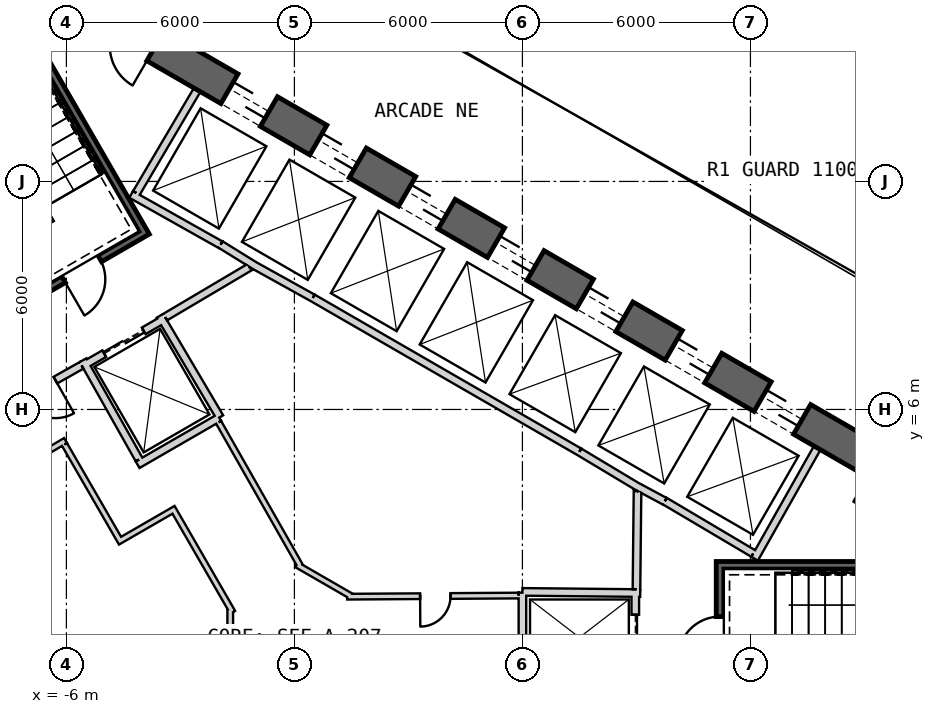
"""IFC4 building model, lengths in metres.
Left out: names, types, materials, properties, quantities, classifications, styles, units other than length and angle.
Written with IfcOpenShell. Run it as: python <this file> out.ifc"""

import sys

from ifc_helpers import new_model, si_unit, direction, frame, frame_2d, origin, place, context, subcontext, project, spatial, rectangle, extrude, element, fill, save


model = new_model("IFC4")
c1 = context("Model", 3, precision=1e-05, world=origin(), true_north=direction((0.0, 1.0)))
c2 = subcontext(c1, "Body", "Model", "MODEL_VIEW")
j1 = project(units=[si_unit("LENGTHUNIT", "METRE"), si_unit("PLANEANGLEUNIT", "RADIAN")], contexts=[c1])
p1 = place(None, origin())
s1 = spatial("IfcSite", under=j1, at=p1, CompositionType="ELEMENT")
p2 = place(p1, origin())
s2 = spatial("IfcBuilding", under=s1, at=p2, CompositionType="ELEMENT")
p3 = place(p2, frame((0.0, 0.0, 27.5)))
s3 = spatial("IfcBuildingStorey", under=s2, at=p3, CompositionType="ELEMENT", Elevation=27.5)
p4 = place(p3, frame((19.475, 2.208, 0.0), z_axis=(0.0, 0.0, 1.0), x_axis=(-0.866028369851, 0.499994862586, 0.0)))
e1 = element("IfcWall", 1, at=p4, inside=s3, PredefinedType="SHEAR", context=c2, shape_type="SweptSolid", body=[
    extrude(rectangle(XDim=31.523, YDim=0.9, at=frame_2d((15.762, 0.0))), origin(), (0.0, 0.0, 1.0), 6.0),
])
p5 = place(p4, frame((7.062, 0.0, 0.0)))
e2 = element("IfcOpeningElement", 2, at=p5, cuts=e1, PredefinedType="OPENING", context=c2, shape_type="SweptSolid", body=[
    extrude(rectangle(XDim=1.2, YDim=2.4, at=frame_2d((0.6, 1.2))), frame((0.0, 0.46, 0.0), z_axis=(0.0, -1.0, 0.0), x_axis=(1.0, 0.0, 0.0)), (0.0, 0.0, 1.0), 0.92),
])
p6 = place(p4, frame((9.762, 0.0, 0.0)))
e3 = element("IfcOpeningElement", 3, at=p6, cuts=e1, PredefinedType="OPENING", context=c2, shape_type="SweptSolid", body=[
    extrude(rectangle(XDim=1.2, YDim=2.4, at=frame_2d((0.6, 1.2))), frame((0.0, 0.46, 0.0), z_axis=(0.0, -1.0, 0.0), x_axis=(1.0, 0.0, 0.0)), (0.0, 0.0, 1.0), 0.92),
])
p7 = place(p4, frame((12.462, 0.0, 0.0)))
e4 = element("IfcOpeningElement", 4, at=p7, cuts=e1, PredefinedType="OPENING", context=c2, shape_type="SweptSolid", body=[
    extrude(rectangle(XDim=1.2, YDim=2.4, at=frame_2d((0.6, 1.2))), frame((0.0, 0.46, 0.0), z_axis=(0.0, -1.0, 0.0), x_axis=(1.0, 0.0, 0.0)), (0.0, 0.0, 1.0), 0.92),
])
p8 = place(p4, frame((15.162, 0.0, 0.0)))
e5 = element("IfcOpeningElement", 5, at=p8, cuts=e1, PredefinedType="OPENING", context=c2, shape_type="SweptSolid", body=[
    extrude(rectangle(XDim=1.2, YDim=2.4, at=frame_2d((0.6, 1.2))), frame((0.0, 0.46, 0.0), z_axis=(0.0, -1.0, 0.0), x_axis=(1.0, 0.0, 0.0)), (0.0, 0.0, 1.0), 0.92),
])
p9 = place(p4, frame((17.862, 0.0, 0.0)))
e6 = element("IfcOpeningElement", 6, at=p9, cuts=e1, PredefinedType="OPENING", context=c2, shape_type="SweptSolid", body=[
    extrude(rectangle(XDim=1.2, YDim=2.4, at=frame_2d((0.6, 1.2))), frame((0.0, 0.46, 0.0), z_axis=(0.0, -1.0, 0.0), x_axis=(1.0, 0.0, 0.0)), (0.0, 0.0, 1.0), 0.92),
])
p10 = place(p4, frame((20.562, 0.0, 0.0)))
e7 = element("IfcOpeningElement", 7, at=p10, cuts=e1, PredefinedType="OPENING", context=c2, shape_type="SweptSolid", body=[
    extrude(rectangle(XDim=1.2, YDim=2.4, at=frame_2d((0.6, 1.2))), frame((0.0, 0.46, 0.0), z_axis=(0.0, -1.0, 0.0), x_axis=(1.0, 0.0, 0.0)), (0.0, 0.0, 1.0), 0.92),
])
p11 = place(p4, frame((23.262, 0.0, 0.0)))
e8 = element("IfcOpeningElement", 8, at=p11, cuts=e1, PredefinedType="OPENING", context=c2, shape_type="SweptSolid", body=[
    extrude(rectangle(XDim=1.2, YDim=2.4, at=frame_2d((0.6, 1.2))), frame((0.0, 0.46, 0.0), z_axis=(0.0, -1.0, 0.0), x_axis=(1.0, 0.0, 0.0)), (0.0, 0.0, 1.0), 0.92),
])
p12 = place(p4, frame((3.612, 0.0, 0.0)))
e9 = element("IfcOpeningElement", 9, at=p12, cuts=e1, PredefinedType="OPENING", context=c2, shape_type="SweptSolid", body=[
    extrude(rectangle(XDim=1.2, YDim=2.4, at=frame_2d((0.6, 1.2))), frame((0.0, 0.46, 0.0), z_axis=(0.0, -1.0, 0.0), x_axis=(1.0, 0.0, 0.0)), (0.0, 0.0, 1.0), 0.92),
])
p13 = place(p4, frame((26.712, 0.0, 0.0)))
e10 = element("IfcOpeningElement", 10, at=p13, cuts=e1, PredefinedType="OPENING", context=c2, shape_type="SweptSolid", body=[
    extrude(rectangle(XDim=1.2, YDim=2.4, at=frame_2d((0.6, 1.2))), frame((0.0, 0.46, 0.0), z_axis=(0.0, -1.0, 0.0), x_axis=(1.0, 0.0, 0.0)), (0.0, 0.0, 1.0), 0.92),
])
p14 = place(p3, frame((7.497, 4.886, 0.0), z_axis=(0.0, 0.0, 1.0), x_axis=(-0.866030989016, 0.499990325971, 0.0)))
e11 = element("IfcWall", 11, at=p14, inside=s3, PredefinedType="PLUMBINGWALL", context=c2, shape_type="SweptSolid", body=[
    extrude(rectangle(XDim=8.1, YDim=0.2, at=frame_2d((4.05, 0.0))), origin(), (0.0, 0.0, 1.0), 5.7),
])
p15 = place(p3, frame((12.11, 2.073, 0.0), z_axis=(0.0, 0.0, 1.0), x_axis=(0.49196600604, 0.870614408852, 0.0)))
e12 = element("IfcWall", 12, at=p15, inside=s3, PredefinedType="PLUMBINGWALL", context=c2, shape_type="SweptSolid", body=[
    extrude(rectangle(XDim=3.35, YDim=0.2, at=frame_2d((1.675, 0.0))), origin(), (0.0, 0.0, 1.0), 5.7),
])
p16 = place(p3, frame((12.073, 2.211, 0.0), z_axis=(0.0, 0.0, 1.0), x_axis=(-0.860438357912, 0.509554542943, 0.0)))
e13 = element("IfcWall", 13, at=p16, inside=s3, PredefinedType="PLUMBINGWALL", context=c2, shape_type="SweptSolid", body=[
    extrude(rectangle(XDim=2.7, YDim=0.2, at=frame_2d((1.35, 0.0))), origin(), (0.0, 0.0, 1.0), 5.7),
])
p17 = place(p3, frame((9.748, 3.583, 0.0), z_axis=(0.0, 0.0, 1.0), x_axis=(-0.880917147855, 0.473270513147, 0.0)))
e14 = element("IfcWall", 14, at=p17, inside=s3, PredefinedType="PLUMBINGWALL", context=c2, shape_type="SweptSolid", body=[
    extrude(rectangle(XDim=0.878, YDim=0.2, at=frame_2d((0.439, 0.0))), origin(), (0.0, 0.0, 1.0), 5.7),
])
p18 = place(p3, frame((9.079, 3.937, 0.0), z_axis=(0.0, 0.0, 1.0), x_axis=(-0.857516281273, 0.51445682749, 0.0)))
e15 = element("IfcWall", 15, at=p18, inside=s3, PredefinedType="PLUMBINGWALL", context=c2, shape_type="SweptSolid", body=[
    extrude(rectangle(XDim=1.845, YDim=0.2, at=frame_2d((0.922, 0.0))), origin(), (0.0, 0.0, 1.0), 5.7),
])
p19 = place(p3, frame((-1.941, 10.339, 0.0), z_axis=(0.0, 0.0, 1.0), x_axis=(0.850216889117, -0.526432561171, 0.0)))
e16 = element("IfcWall", 16, at=p19, inside=s3, PredefinedType="PLUMBINGWALL", context=c2, shape_type="SweptSolid", body=[
    extrude(rectangle(XDim=1.078, YDim=0.2, at=frame_2d((0.539, 0.0))), origin(), (0.0, 0.0, 1.0), 5.7),
])
p20 = place(p3, frame((0.483, 8.936, 0.0), z_axis=(0.0, 0.0, 1.0), x_axis=(-0.874269620932, 0.485440655401, 0.0)))
e17 = element("IfcWall", 17, at=p20, inside=s3, PredefinedType="PLUMBINGWALL", context=c2, shape_type="SweptSolid", body=[
    extrude(rectangle(XDim=1.845, YDim=0.2, at=frame_2d((0.922, 0.0))), origin(), (0.0, 0.0, 1.0), 5.7),
])
p21 = place(p3, frame((-4.296, 11.659, 0.0), z_axis=(0.0, 0.0, 1.0), x_axis=(0.871534483978, -0.490334215854, 0.0)))
e18 = element("IfcWall", 18, at=p21, inside=s3, PredefinedType="PLUMBINGWALL", context=c2, shape_type="SweptSolid", body=[
    extrude(rectangle(XDim=2.7, YDim=0.2, at=frame_2d((1.35, 0.0))), origin(), (0.0, 0.0, 1.0), 5.7),
])
p22 = place(p3, frame((-4.158, 11.696, 0.0), z_axis=(0.0, 0.0, 1.0), x_axis=(0.508018930956, 0.861345903683, 0.0)))
e19 = element("IfcWall", 19, at=p22, inside=s3, PredefinedType="PLUMBINGWALL", context=c2, shape_type="SweptSolid", body=[
    extrude(rectangle(XDim=3.15, YDim=0.2, at=frame_2d((1.575, 0.0))), origin(), (0.0, 0.0, 1.0), 5.7),
])
p23 = place(p3, frame((19.2, 1.9, -0.3), z_axis=(0.0, 0.0, 1.0), x_axis=(-1.0, 0.0, 0.0)))
e20 = element("IfcWall", 20, at=p23, inside=s3, PredefinedType="SHEAR", context=c2, shape_type="SweptSolid", body=[
    extrude(rectangle(XDim=8.1, YDim=0.2, at=frame_2d((4.05, 0.0))), origin(), (0.0, 0.0, 1.0), 6.0),
])
p24 = place(p3, frame((11.2, -1.8, -0.3), z_axis=(0.0, 0.0, 1.0), x_axis=(0.0, 1.0, 0.0)))
e21 = element("IfcWall", 21, at=p24, inside=s3, PredefinedType="SHEAR", context=c2, shape_type="SweptSolid", body=[
    extrude(rectangle(XDim=3.6, YDim=0.2, at=frame_2d((1.8, 0.0))), origin(), (0.0, 0.0, 1.0), 6.0),
])
p25 = place(p24, frame((1.25, 0.0, 0.3)))
e22 = element("IfcOpeningElement", 22, at=p25, cuts=e21, PredefinedType="OPENING", context=c2, shape_type="SweptSolid", body=[
    extrude(rectangle(XDim=1.1, YDim=2.1, at=frame_2d((0.55, 1.05))), frame((0.0, 0.11, 0.0), z_axis=(0.0, -1.0, 0.0), x_axis=(1.0, 0.0, 0.0)), (0.0, 0.0, 1.0), 0.22),
])
p26 = place(p3, frame((8.97, 1.2, 0.0), z_axis=(0.0, 0.0, 1.0), x_axis=(0.0, -1.0, 0.0)))
e23 = element("IfcWall", 23, at=p26, inside=s3, PredefinedType="PLUMBINGWALL", context=c2, shape_type="SweptSolid", body=[
    extrude(rectangle(XDim=2.4, YDim=0.2, at=frame_2d((1.2, 0.0))), origin(), (0.0, 0.0, 1.0), 5.7),
])
p27 = place(p26, frame((0.6, 0.0, 0.0)))
e24 = element("IfcOpeningElement", 24, at=p27, cuts=e23, PredefinedType="OPENING", context=c2, shape_type="SweptSolid", body=[
    extrude(rectangle(XDim=1.2, YDim=2.4, at=frame_2d((0.6, 1.2))), frame((0.0, 0.11, 0.0), z_axis=(0.0, -1.0, 0.0), x_axis=(1.0, 0.0, 0.0)), (0.0, 0.0, 1.0), 0.22),
])
p28 = place(p3, frame((6.0, 1.2, 0.0), z_axis=(0.0, 0.0, 1.0), x_axis=(0.999949988, -0.010001074852, 0.0)))
e25 = element("IfcWall", 25, at=p28, inside=s3, PredefinedType="PLUMBINGWALL", context=c2, shape_type="SweptSolid", body=[
    extrude(rectangle(XDim=3.1, YDim=0.2, at=frame_2d((1.55, 0.0))), origin(), (0.0, 0.0, 1.0), 5.7),
])
p29 = place(p3, frame((6.0, -1.1, 0.0), z_axis=(0.0, 0.0, 1.0), x_axis=(0.0, 1.0, 0.0)))
e26 = element("IfcWall", 26, at=p29, inside=s3, PredefinedType="PLUMBINGWALL", context=c2, shape_type="SweptSolid", body=[
    extrude(rectangle(XDim=2.28, YDim=0.2, at=frame_2d((1.14, 0.0))), origin(), (0.0, 0.0, 1.0), 5.7),
])
p30 = place(p3, frame((-7.854, 17.405, -0.3), z_axis=(0.0, 0.0, 1.0), x_axis=(0.499997992926, -0.866026562566, 0.0)))
e27 = element("IfcWall", 27, at=p30, inside=s3, PredefinedType="SHEAR", context=c2, shape_type="SweptSolid", body=[
    extrude(rectangle(XDim=7.9, YDim=0.2, at=frame_2d((3.95, 0.0))), origin(), (0.0, 0.0, 1.0), 6.0),
])
p31 = place(p3, frame((-7.159, 8.8, -0.3), z_axis=(0.0, 0.0, 1.0), x_axis=(0.866047807691, 0.499961193289, 0.0)))
e28 = element("IfcWall", 28, at=p31, inside=s3, PredefinedType="SHEAR", context=c2, shape_type="SweptSolid", body=[
    extrude(rectangle(XDim=3.6, YDim=0.2, at=frame_2d((1.8, 0.0))), origin(), (0.0, 0.0, 1.0), 6.0),
])
p32 = place(p31, frame((1.25, 0.0, 0.3)))
e29 = element("IfcOpeningElement", 29, at=p32, cuts=e28, PredefinedType="OPENING", context=c2, shape_type="SweptSolid", body=[
    extrude(rectangle(XDim=1.1, YDim=2.1, at=frame_2d((0.55, 1.05))), frame((0.0, 0.11, 0.0), z_axis=(0.0, -1.0, 0.0), x_axis=(1.0, 0.0, 0.0)), (0.0, 0.0, 1.0), 0.22),
])
p33 = place(p3, frame((-5.524, 7.168, 0.0), z_axis=(0.0, 0.0, 1.0), x_axis=(0.866024647952, 0.500001309137, 0.0)))
e30 = element("IfcWall", 30, at=p33, inside=s3, PredefinedType="PLUMBINGWALL", context=c2, shape_type="SweptSolid", body=[
    extrude(rectangle(XDim=2.4, YDim=0.2, at=frame_2d((1.2, 0.0))), origin(), (0.0, 0.0, 1.0), 5.7),
])
p34 = place(p33, frame((0.6, 0.0, 0.0)))
e31 = element("IfcOpeningElement", 31, at=p34, cuts=e30, PredefinedType="OPENING", context=c2, shape_type="SweptSolid", body=[
    extrude(rectangle(XDim=1.2, YDim=2.4, at=frame_2d((0.6, 1.2))), frame((0.0, 0.11, 0.0), z_axis=(0.0, -1.0, 0.0), x_axis=(1.0, 0.0, 0.0)), (0.0, 0.0, 1.0), 0.22),
])
p35 = place(p3, frame((-3.538, 8.465, 0.0), z_axis=(0.0, 0.0, 1.0), x_axis=(0.508647062354, -0.860975125052, 0.0)))
e32 = element("IfcWall", 32, at=p35, inside=s3, PredefinedType="PLUMBINGWALL", context=c2, shape_type="SweptSolid", body=[
    extrude(rectangle(XDim=3.1, YDim=0.2, at=frame_2d((1.55, 0.0))), origin(), (0.0, 0.0, 1.0), 5.7),
])
p36 = place(p3, frame((-1.979, 5.786, 0.0), z_axis=(0.0, 0.0, 1.0), x_axis=(-0.866016689309, -0.500015093611, 0.0)))
e33 = element("IfcWall", 33, at=p36, inside=s3, PredefinedType="PLUMBINGWALL", context=c2, shape_type="SweptSolid", body=[
    extrude(rectangle(XDim=2.479, YDim=0.2, at=frame_2d((1.24, 0.0))), origin(), (0.0, 0.0, 1.0), 5.7),
])
p37 = place(p3, frame((-5.562, 7.296, 0.0), z_axis=(0.0, 0.0, 1.0), x_axis=(0.49134651263, -0.870964180966, 0.0)))
e34 = element("IfcWall", 34, at=p37, inside=s3, PredefinedType="PLUMBINGWALL", context=c2, shape_type="SweptSolid", body=[
    extrude(rectangle(XDim=3.0, YDim=0.2, at=frame_2d((1.5, 0.0))), origin(), (0.0, 0.0, 1.0), 5.7),
])
p38 = place(p3, frame((9.001, 1.27, 0.0), z_axis=(0.0, 0.0, 1.0), x_axis=(0.010784614026, 0.999941844359, 0.0)))
e35 = element("IfcWall", 35, at=p38, inside=s3, PredefinedType="PARTITIONING", context=c2, shape_type="SweptSolid", body=[
    extrude(rectangle(XDim=2.581, YDim=0.2, at=frame_2d((1.291, 0.0))), origin(), (0.0, 0.0, 1.0), 5.7),
])
p39 = place(p3, frame((-1.18, 9.744, 0.0), z_axis=(0.0, 0.0, 1.0), x_axis=(-0.860615607571, -0.509255118781, 0.0)))
e36 = element("IfcWall", 36, at=p39, inside=s3, PredefinedType="PARTITIONING", context=c2, shape_type="SweptSolid", body=[
    extrude(rectangle(XDim=2.581, YDim=0.2, at=frame_2d((1.29, 0.0))), origin(), (0.0, 0.0, 1.0), 5.7),
])
p40 = place(p3, frame((-5.6, 7.16, 0.0), z_axis=(0.0, 0.0, 1.0), x_axis=(-0.871363259478, -0.490638431059, 0.0)))
e37 = element("IfcWall", 37, at=p40, inside=s3, PredefinedType="PARTITIONING", context=c2, shape_type="SweptSolid", body=[
    extrude(rectangle(XDim=2.581, YDim=0.2, at=frame_2d((1.291, 0.0))), origin(), (0.0, 0.0, 1.0), 5.7),
])
p41 = place(p40, frame((0.791, 0.0, 0.0)))
e38 = element("IfcOpeningElement", 38, at=p41, cuts=e37, PredefinedType="OPENING", context=c2, shape_type="SweptSolid", body=[
    extrude(rectangle(XDim=1.0, YDim=2.1, at=frame_2d((0.5, 1.05))), frame((0.0, 0.11, 0.0), z_axis=(0.0, -1.0, 0.0), x_axis=(1.0, 0.0, 0.0)), (0.0, 0.0, 1.0), 0.22),
])
p42 = place(p3, frame((1.388, 1.074, 0.0), z_axis=(0.0, 0.0, 1.0), x_axis=(0.99997856967, 0.006546770205, 0.0)))
e39 = element("IfcWall", 39, at=p42, inside=s3, PredefinedType="PLUMBINGWALL", context=c2, shape_type="SweptSolid", body=[
    extrude(rectangle(XDim=4.512, YDim=0.15, at=frame_2d((2.256, 0.0))), origin(), (0.0, 0.0, 1.0), 5.7),
])
p43 = place(p42, frame((1.92, 0.0, 0.0)))
e40 = element("IfcOpeningElement", 40, at=p43, cuts=e39, PredefinedType="OPENING", context=c2, shape_type="SweptSolid", body=[
    extrude(rectangle(XDim=0.8, YDim=2.1, at=frame_2d((0.4, 1.05))), frame((0.0, 0.085, 0.0), z_axis=(0.0, -1.0, 0.0), x_axis=(1.0, 0.0, 0.0)), (0.0, 0.0, 1.0), 0.17),
])
p44 = place(p3, frame((0.062, 1.914, 0.0), z_axis=(0.0, 0.0, 1.0), x_axis=(0.866018462269, -0.500012022864, 0.0)))
e41 = element("IfcWall", 41, at=p44, inside=s3, PredefinedType="PLUMBINGWALL", context=c2, shape_type="SweptSolid", body=[
    extrude(rectangle(XDim=1.654, YDim=0.15, at=frame_2d((0.827, 0.0))), origin(), (0.0, 0.0, 1.0), 5.7),
])
p45 = place(p3, frame((-1.994, 5.661, 0.0), z_axis=(0.0, 0.0, 1.0), x_axis=(0.494341211302, -0.869267948798, 0.0)))
e42 = element("IfcWall", 42, at=p45, inside=s3, PredefinedType="PLUMBINGWALL", context=c2, shape_type="SweptSolid", body=[
    extrude(rectangle(XDim=4.361, YDim=0.15, at=frame_2d((2.18, 0.0))), origin(), (0.0, 0.0, 1.0), 5.7),
])
p46 = place(p3, frame((-6.024, 5.183, 0.0), z_axis=(0.0, 0.0, 1.0), x_axis=(-0.860126804455, -0.510080268447, 0.0)))
e43 = element("IfcWall", 43, at=p46, inside=s3, PredefinedType="PLUMBINGWALL", context=c2, shape_type="SweptSolid", body=[
    extrude(rectangle(XDim=2.24, YDim=0.15, at=frame_2d((1.12, 0.0))), origin(), (0.0, 0.0, 1.0), 5.7),
])
p47 = place(p3, frame((-4.551, 2.482, 0.0), z_axis=(0.0, 0.0, 1.0), x_axis=(-0.499990139034, 0.866031096941, 0.0)))
e44 = element("IfcWall", 44, at=p47, inside=s3, PredefinedType="PLUMBINGWALL", context=c2, shape_type="SweptSolid", body=[
    extrude(rectangle(XDim=3.0, YDim=0.15, at=frame_2d((1.5, 0.0))), origin(), (0.0, 0.0, 1.0), 5.7),
])
p48 = place(p3, frame((-3.116, 3.397, 0.0), z_axis=(0.0, 0.0, 1.0), x_axis=(-0.866053003207, -0.499952193351, 0.0)))
e45 = element("IfcWall", 45, at=p48, inside=s3, PredefinedType="PLUMBINGWALL", context=c2, shape_type="SweptSolid", body=[
    extrude(rectangle(XDim=1.625, YDim=0.15, at=frame_2d((0.812, 0.0))), origin(), (0.0, 0.0, 1.0), 5.7),
])
p49 = place(p3, frame((-1.624, 0.663, 0.0), z_axis=(0.0, 0.0, 1.0), x_axis=(-0.500035348339, 0.866004994449, 0.0)))
e46 = element("IfcWall", 46, at=p49, inside=s3, PredefinedType="PLUMBINGWALL", context=c2, shape_type="SweptSolid", body=[
    extrude(rectangle(XDim=3.039, YDim=0.15, at=frame_2d((1.52, 0.0))), origin(), (0.0, 0.0, 1.0), 5.7),
])
p50 = place(p3, frame((-1.689, -0.905, 0.0), z_axis=(0.0, 0.0, 1.0), x_axis=(0.0, 1.0, 0.0)))
e47 = element("IfcWall", 47, at=p50, inside=s3, PredefinedType="PLUMBINGWALL", context=c2, shape_type="SweptSolid", body=[
    extrude(rectangle(XDim=1.656, YDim=0.15, at=frame_2d((0.828, 0.0))), origin(), (0.0, 0.0, 1.0), 5.7),
])
p51 = place(p25, origin())
e48 = element("IfcDoor", 48, at=p51, inside=s3, OperationType="SINGLE_SWING_LEFT", PredefinedType="USERDEFINED", context=c2, shape_type="SweptSolid", body=[
    extrude(rectangle(XDim=1.1, YDim=2.1, at=frame_2d((0.55, 1.05))), frame((0.0, 0.025, 0.0), z_axis=(0.0, -1.0, 0.0), x_axis=(1.0, 0.0, 0.0)), (0.0, 0.0, 1.0), 0.05),
])
fill(e22, e48)
p52 = place(p27, origin())
e49 = element("IfcDoor", 49, at=p52, inside=s3, OperationType="SLIDING_TO_LEFT", PredefinedType="USERDEFINED", context=c2, shape_type="SweptSolid", body=[
    extrude(rectangle(XDim=1.2, YDim=2.4, at=frame_2d((0.6, 1.2))), frame((0.0, 0.025, 0.0), z_axis=(0.0, -1.0, 0.0), x_axis=(1.0, 0.0, 0.0)), (0.0, 0.0, 1.0), 0.05),
])
fill(e24, e49)
p53 = place(p32, origin())
e50 = element("IfcDoor", 50, at=p53, inside=s3, OperationType="SINGLE_SWING_LEFT", PredefinedType="USERDEFINED", context=c2, shape_type="SweptSolid", body=[
    extrude(rectangle(XDim=1.1, YDim=2.1, at=frame_2d((0.55, 1.05))), frame((0.0, 0.025, 0.0), z_axis=(0.0, -1.0, 0.0), x_axis=(1.0, 0.0, 0.0)), (0.0, 0.0, 1.0), 0.05),
])
fill(e29, e50)
p54 = place(p41, origin())
e51 = element("IfcDoor", 51, at=p54, inside=s3, OperationType="SINGLE_SWING_LEFT", PredefinedType="USERDEFINED", context=c2, shape_type="SweptSolid", body=[
    extrude(rectangle(XDim=1.0, YDim=2.1, at=frame_2d((0.5, 1.05))), frame((0.0, 0.025, 0.0), z_axis=(0.0, -1.0, 0.0), x_axis=(1.0, 0.0, 0.0)), (0.0, 0.0, 1.0), 0.05),
])
fill(e38, e51)
p55 = place(p34, origin())
e52 = element("IfcDoor", 52, at=p55, inside=s3, OperationType="SLIDING_TO_LEFT", PredefinedType="USERDEFINED", context=c2, shape_type="SweptSolid", body=[
    extrude(rectangle(XDim=1.2, YDim=2.4, at=frame_2d((0.6, 1.2))), frame((0.0, 0.025, 0.0), z_axis=(0.0, -1.0, 0.0), x_axis=(1.0, 0.0, 0.0)), (0.0, 0.0, 1.0), 0.05),
])
fill(e31, e52)
p56 = place(p43, origin())
e53 = element("IfcDoor", 53, at=p56, inside=s3, OperationType="SINGLE_SWING_LEFT", PredefinedType="USERDEFINED", context=c2, shape_type="SweptSolid", body=[
    extrude(rectangle(XDim=0.8, YDim=2.1, at=frame_2d((0.4, 1.05))), frame((0.0, 0.025, 0.0), z_axis=(0.0, -1.0, 0.0), x_axis=(1.0, 0.0, 0.0)), (0.0, 0.0, 1.0), 0.05),
])
fill(e40, e53)
p57 = place(p5, origin())
e54 = element("IfcDoor", 54, at=p57, inside=s3, OperationType="SLIDING_TO_LEFT", PredefinedType="USERDEFINED", context=c2, shape_type="SweptSolid", body=[
    extrude(rectangle(XDim=1.2, YDim=2.4, at=frame_2d((0.6, 1.2))), frame((0.0, 0.025, 0.0), z_axis=(0.0, -1.0, 0.0), x_axis=(1.0, 0.0, 0.0)), (0.0, 0.0, 1.0), 0.05),
])
fill(e2, e54)
p58 = place(p6, origin())
e55 = element("IfcDoor", 55, at=p58, inside=s3, OperationType="SLIDING_TO_LEFT", PredefinedType="USERDEFINED", context=c2, shape_type="SweptSolid", body=[
    extrude(rectangle(XDim=1.2, YDim=2.4, at=frame_2d((0.6, 1.2))), frame((0.0, 0.025, 0.0), z_axis=(0.0, -1.0, 0.0), x_axis=(1.0, 0.0, 0.0)), (0.0, 0.0, 1.0), 0.05),
])
fill(e3, e55)
p59 = place(p7, origin())
e56 = element("IfcDoor", 56, at=p59, inside=s3, OperationType="SLIDING_TO_LEFT", PredefinedType="USERDEFINED", context=c2, shape_type="SweptSolid", body=[
    extrude(rectangle(XDim=1.2, YDim=2.4, at=frame_2d((0.6, 1.2))), frame((0.0, 0.025, 0.0), z_axis=(0.0, -1.0, 0.0), x_axis=(1.0, 0.0, 0.0)), (0.0, 0.0, 1.0), 0.05),
])
fill(e4, e56)
p60 = place(p8, origin())
e57 = element("IfcDoor", 57, at=p60, inside=s3, OperationType="SLIDING_TO_LEFT", PredefinedType="USERDEFINED", context=c2, shape_type="SweptSolid", body=[
    extrude(rectangle(XDim=1.2, YDim=2.4, at=frame_2d((0.6, 1.2))), frame((0.0, 0.025, 0.0), z_axis=(0.0, -1.0, 0.0), x_axis=(1.0, 0.0, 0.0)), (0.0, 0.0, 1.0), 0.05),
])
fill(e5, e57)
p61 = place(p9, origin())
e58 = element("IfcDoor", 58, at=p61, inside=s3, OperationType="SLIDING_TO_LEFT", PredefinedType="USERDEFINED", context=c2, shape_type="SweptSolid", body=[
    extrude(rectangle(XDim=1.2, YDim=2.4, at=frame_2d((0.6, 1.2))), frame((0.0, 0.025, 0.0), z_axis=(0.0, -1.0, 0.0), x_axis=(1.0, 0.0, 0.0)), (0.0, 0.0, 1.0), 0.05),
])
fill(e6, e58)
p62 = place(p10, origin())
e59 = element("IfcDoor", 59, at=p62, inside=s3, OperationType="SLIDING_TO_LEFT", PredefinedType="USERDEFINED", context=c2, shape_type="SweptSolid", body=[
    extrude(rectangle(XDim=1.2, YDim=2.4, at=frame_2d((0.6, 1.2))), frame((0.0, 0.025, 0.0), z_axis=(0.0, -1.0, 0.0), x_axis=(1.0, 0.0, 0.0)), (0.0, 0.0, 1.0), 0.05),
])
fill(e7, e59)
p63 = place(p11, origin())
e60 = element("IfcDoor", 60, at=p63, inside=s3, OperationType="SLIDING_TO_LEFT", PredefinedType="USERDEFINED", context=c2, shape_type="SweptSolid", body=[
    extrude(rectangle(XDim=1.2, YDim=2.4, at=frame_2d((0.6, 1.2))), frame((0.0, 0.025, 0.0), z_axis=(0.0, -1.0, 0.0), x_axis=(1.0, 0.0, 0.0)), (0.0, 0.0, 1.0), 0.05),
])
fill(e8, e60)
save(model, sys.argv[1])
